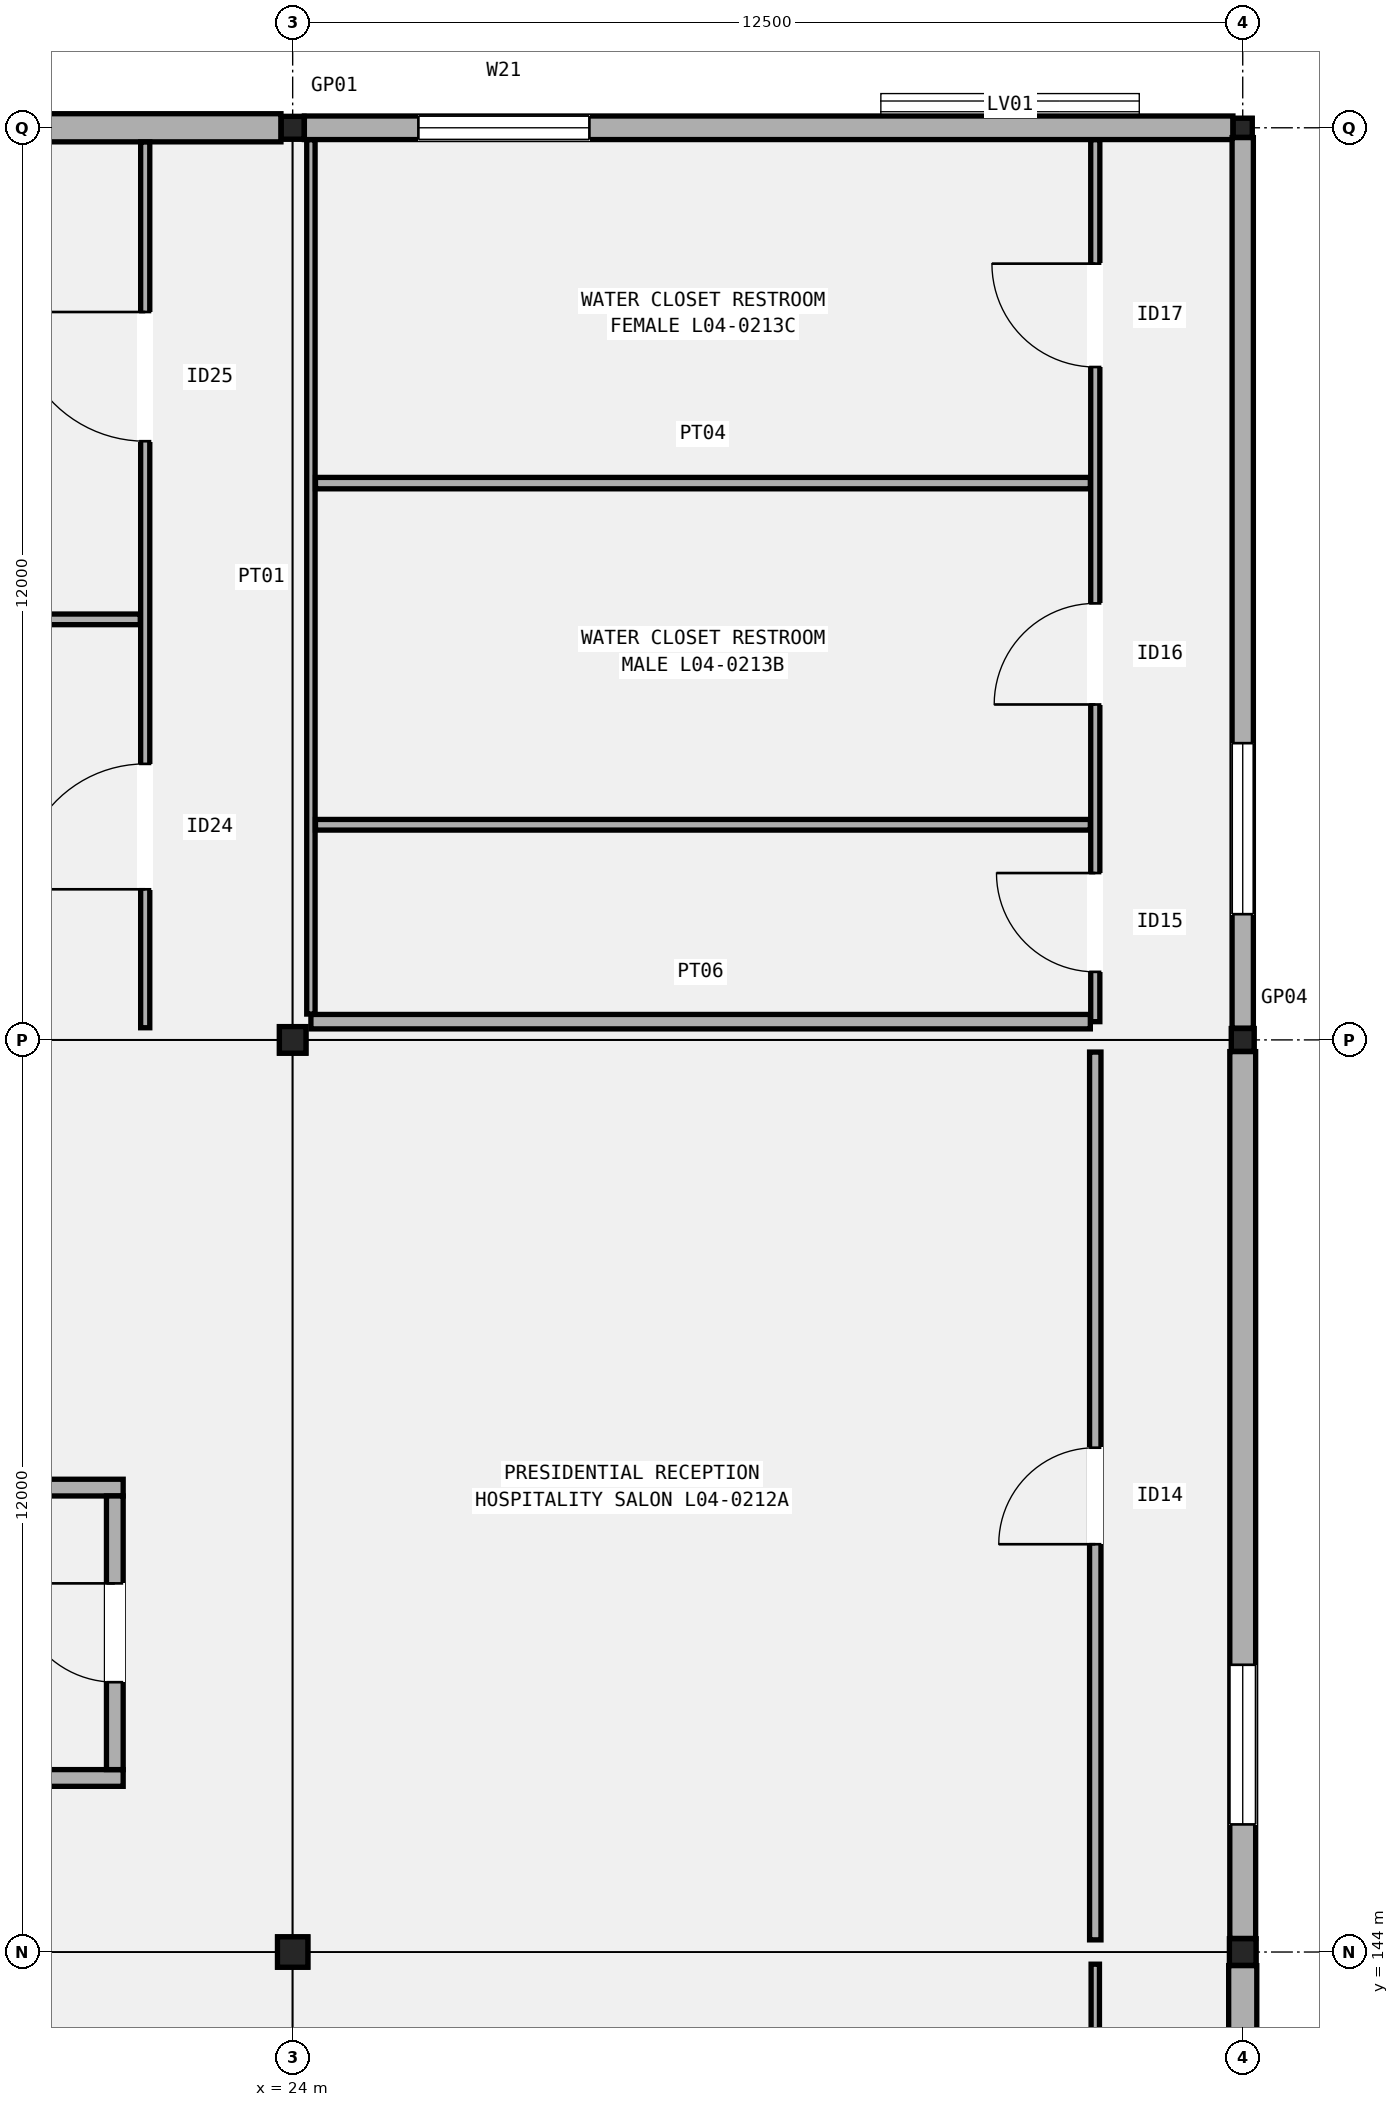
"""IFC4 building model, lengths in metres.
Left out: names, types, materials, properties, quantities, classifications, styles, units other than length and angle.
Written with IfcOpenShell. Run it as: python <this file> out.ifc"""

import sys

from ifc_helpers import new_model, si_unit, direction, frame, frame_2d, origin, origin_2d, place, context, subcontext, project, spatial, rectangle, hollow_rectangle, extrude, element, fill, save


model = new_model("IFC4")
c1 = context("Model", 3, precision=1e-05, world=origin(), true_north=direction((0.0, 1.0)))
c2 = subcontext(c1, "Body", "Model", "MODEL_VIEW")
j1 = project(units=[si_unit("LENGTHUNIT", "METRE"), si_unit("PLANEANGLEUNIT", "RADIAN")], contexts=[c1])
p1 = place(None, origin())
s1 = spatial("IfcSite", under=j1, at=p1, CompositionType="ELEMENT")
p2 = place(p1, origin())
s2 = spatial("IfcBuilding", under=s1, at=p2, CompositionType="ELEMENT")
p3 = place(p2, frame((0.0, 0.0, 20.4)))
s3 = spatial("IfcBuildingStorey", under=s2, at=p3, CompositionType="ELEMENT", Elevation=20.4)
p4 = place(p3, frame((24.0, 144.0, 0.0), z_axis=(0.0, 0.0, 1.0), x_axis=(1.0, 0.0, 0.0)))
e1 = element("IfcColumn", 1, at=p4, inside=s3, PredefinedType="COLUMN", context=c2, shape_type="SweptSolid", body=[
    extrude(hollow_rectangle(XDim=0.4, YDim=0.4, WallThickness=0.016, InnerFilletRadius=0.016, OuterFilletRadius=0.032, at=origin_2d()), origin(), (0.0, 0.0, 1.0), 5.4),
])
p5 = place(p3, frame((24.0, 156.0, 0.0), z_axis=(0.0, 0.0, 1.0), x_axis=(1.0, 0.0, 0.0)))
e2 = element("IfcColumn", 2, at=p5, inside=s3, PredefinedType="COLUMN", context=c2, shape_type="SweptSolid", body=[
    extrude(hollow_rectangle(XDim=0.35, YDim=0.35, WallThickness=0.016, InnerFilletRadius=0.016, OuterFilletRadius=0.032, at=origin_2d()), origin(), (0.0, 0.0, 1.0), 5.4),
])
p6 = place(p3, frame((24.0, 168.0, 0.0), z_axis=(0.0, 0.0, 1.0), x_axis=(1.0, 0.0, 0.0)))
e3 = element("IfcColumn", 3, at=p6, inside=s3, PredefinedType="COLUMN", context=c2, shape_type="SweptSolid", body=[
    extrude(hollow_rectangle(XDim=0.3, YDim=0.3, WallThickness=0.012, InnerFilletRadius=0.012, OuterFilletRadius=0.024, at=origin_2d()), origin(), (0.0, 0.0, 1.0), 5.4),
])
p7 = place(p3, frame((36.5, 144.0, 0.0), z_axis=(0.0, 0.0, 1.0), x_axis=(1.0, 0.0, 0.0)))
e4 = element("IfcColumn", 4, at=p7, inside=s3, PredefinedType="COLUMN", context=c2, shape_type="SweptSolid", body=[
    extrude(hollow_rectangle(XDim=0.35, YDim=0.35, WallThickness=0.016, InnerFilletRadius=0.016, OuterFilletRadius=0.032, at=origin_2d()), origin(), (0.0, 0.0, 1.0), 5.4),
])
p8 = place(p3, frame((36.5, 156.0, 0.0), z_axis=(0.0, 0.0, 1.0), x_axis=(1.0, 0.0, 0.0)))
e5 = element("IfcColumn", 5, at=p8, inside=s3, PredefinedType="COLUMN", context=c2, shape_type="SweptSolid", body=[
    extrude(hollow_rectangle(XDim=0.3, YDim=0.3, WallThickness=0.012, InnerFilletRadius=0.012, OuterFilletRadius=0.024, at=origin_2d()), origin(), (0.0, 0.0, 1.0), 5.4),
])
p9 = place(p3, frame((36.5, 168.0, 0.0), z_axis=(0.0, 0.0, 1.0), x_axis=(1.0, 0.0, 0.0)))
e6 = element("IfcColumn", 6, at=p9, inside=s3, PredefinedType="COLUMN", context=c2, shape_type="SweptSolid", body=[
    extrude(hollow_rectangle(XDim=0.25, YDim=0.25, WallThickness=0.012, InnerFilletRadius=0.012, OuterFilletRadius=0.024, at=origin_2d()), origin(), (0.0, 0.0, 1.0), 5.4),
])
p10 = place(p3, frame((12.179, 168.0, 0.0), z_axis=(0.0, 0.0, 1.0), x_axis=(1.0, 0.0, 0.0)))
e7 = element("IfcWall", 7, at=p10, inside=s3, PredefinedType="SOLIDWALL", context=c2, shape_type="SweptSolid", body=[
    extrude(rectangle(XDim=11.667, YDim=0.37, at=frame_2d((5.833, 0.0))), origin(), (0.0, 0.0, 1.0), 4.48),
])
p11 = place(p10, frame((1.5, 0.0, 0.95)))
e8 = element("IfcOpeningElement", 8, at=p11, cuts=e7, PredefinedType="OPENING", context=c2, shape_type="SweptSolid", body=[
    extrude(rectangle(XDim=1.8, YDim=1.75, at=frame_2d((0.9, 0.875))), frame((0.0, 0.195, 0.0), z_axis=(0.0, -1.0, 0.0), x_axis=(1.0, 0.0, 0.0)), (0.0, 0.0, 1.0), 0.39),
])
p12 = place(p3, frame((36.5, 132.204, 0.0), z_axis=(0.0, 0.0, 1.0), x_axis=(0.0, 1.0, 0.0)))
e9 = element("IfcWall", 9, at=p12, inside=s3, PredefinedType="SOLIDWALL", context=c2, shape_type="SweptSolid", body=[
    extrude(rectangle(XDim=11.617, YDim=0.37, at=frame_2d((5.809, 0.0))), origin(), (0.0, 0.0, 1.0), 4.592),
])
p13 = place(p12, frame((1.5, 0.0, 0.95)))
e10 = element("IfcOpeningElement", 10, at=p13, cuts=e9, PredefinedType="OPENING", context=c2, shape_type="SweptSolid", body=[
    extrude(rectangle(XDim=2.1, YDim=2.25, at=frame_2d((1.05, 1.125))), frame((0.0, 0.195, 0.0), z_axis=(0.0, -1.0, 0.0), x_axis=(1.0, 0.0, 0.0)), (0.0, 0.0, 1.0), 0.39),
])
p14 = place(p3, frame((36.5, 144.179, 0.0), z_axis=(0.0, 0.0, 1.0), x_axis=(0.0, 1.0, 0.0)))
e11 = element("IfcWall", 11, at=p14, inside=s3, PredefinedType="SOLIDWALL", context=c2, shape_type="SweptSolid", body=[
    extrude(rectangle(XDim=11.667, YDim=0.34, at=frame_2d((5.833, 0.0))), origin(), (0.0, 0.0, 1.0), 4.48),
])
p15 = place(p14, frame((1.5, 0.0, 0.95)))
e12 = element("IfcOpeningElement", 12, at=p15, cuts=e11, PredefinedType="OPENING", context=c2, shape_type="SweptSolid", body=[
    extrude(rectangle(XDim=2.1, YDim=2.6, at=frame_2d((1.05, 1.3))), frame((0.0, 0.18, 0.0), z_axis=(0.0, -1.0, 0.0), x_axis=(1.0, 0.0, 0.0)), (0.0, 0.0, 1.0), 0.36),
])
p16 = place(p3, frame((24.154, 168.0, 0.0), z_axis=(0.0, 0.0, 1.0), x_axis=(1.0, 0.0, 0.0)))
e13 = element("IfcWall", 13, at=p16, inside=s3, PredefinedType="SOLIDWALL", context=c2, shape_type="SweptSolid", body=[
    extrude(rectangle(XDim=12.217, YDim=0.31, at=frame_2d((6.108, 0.0))), origin(), (0.0, 0.0, 1.0), 4.58),
])
p17 = place(p16, frame((1.5, 0.0, 0.95)))
e14 = element("IfcOpeningElement", 14, at=p17, cuts=e13, PredefinedType="OPENING", context=c2, shape_type="SweptSolid", body=[
    extrude(rectangle(XDim=2.25, YDim=1.8, at=frame_2d((1.125, 0.9))), frame((0.0, 0.165, 0.0), z_axis=(0.0, -1.0, 0.0), x_axis=(1.0, 0.0, 0.0)), (0.0, 0.0, 1.0), 0.33),
])
p18 = place(p3, frame((36.5, 156.154, 0.0), z_axis=(0.0, 0.0, 1.0), x_axis=(0.0, 1.0, 0.0)))
e15 = element("IfcWall", 15, at=p18, inside=s3, PredefinedType="SOLIDWALL", context=c2, shape_type="SweptSolid", body=[
    extrude(rectangle(XDim=11.717, YDim=0.28, at=frame_2d((5.858, 0.0))), origin(), (0.0, 0.0, 1.0), 4.58),
])
p19 = place(p18, frame((1.5, 0.0, 0.95)))
e16 = element("IfcOpeningElement", 16, at=p19, cuts=e15, PredefinedType="OPENING", context=c2, shape_type="SweptSolid", body=[
    extrude(rectangle(XDim=2.25, YDim=2.2, at=frame_2d((1.125, 1.1))), frame((0.0, 0.15, 0.0), z_axis=(0.0, -1.0, 0.0), x_axis=(1.0, 0.0, 0.0)), (0.0, 0.0, 1.0), 0.3),
])
for number, where, z_axis, x_axis in (
    (17, (17.48, 146.29, 0.0), (0.0, 0.0, 1.0), (1.0, 0.0, 0.0)),
    (18, (17.48, 150.11, 0.0), (0.0, 0.0, 1.0), (1.0, 0.0, 0.0)),
):
    element("IfcWall", number, at=place(p3, frame(where, z_axis=z_axis, x_axis=x_axis)), inside=s3, PredefinedType="SOLIDWALL", context=c2, shape_type="SweptSolid", body=[
        extrude(rectangle(XDim=4.29, YDim=0.22, at=frame_2d((2.145, 0.0))), origin(), (0.0, 0.0, 1.0), 4.52),
    ])
p20 = place(p3, frame((21.66, 146.4, 0.0), z_axis=(0.0, 0.0, 1.0), x_axis=(0.0, 1.0, 0.0)))
e19 = element("IfcWall", 19, at=p20, inside=s3, PredefinedType="SOLIDWALL", context=c2, shape_type="SweptSolid", body=[
    extrude(rectangle(XDim=3.6, YDim=0.22, at=frame_2d((1.8, 0.0))), origin(), (0.0, 0.0, 1.0), 4.52),
])
p21 = place(p20, frame((1.15, 0.0, 0.0)))
e20 = element("IfcOpeningElement", 20, at=p21, cuts=e19, PredefinedType="OPENING", context=c2, shape_type="SweptSolid", body=[
    extrude(rectangle(XDim=1.3, YDim=2.15, at=frame_2d((0.65, 1.075))), frame((0.0, 0.12, 0.0), z_axis=(0.0, -1.0, 0.0), x_axis=(1.0, 0.0, 0.0)), (0.0, 0.0, 1.0), 0.24),
])
p22 = place(p3, frame((22.06, 156.16, 0.0), z_axis=(0.0, 0.0, 1.0), x_axis=(0.0, 1.0, 0.0)))
e21 = element("IfcWall", 21, at=p22, inside=s3, PredefinedType="PARTITIONING", context=c2, shape_type="SweptSolid", body=[
    extrude(rectangle(XDim=11.653, YDim=0.12, at=frame_2d((5.827, 0.0))), origin(), (0.0, 0.0, 1.0), 4.52),
])
p23 = place(p22, frame((1.821, 0.0, 0.0)))
e22 = element("IfcOpeningElement", 22, at=p23, cuts=e21, PredefinedType="OPENING", context=c2, shape_type="SweptSolid", body=[
    extrude(rectangle(XDim=1.65, YDim=2.28, at=frame_2d((0.825, 1.14))), frame((0.0, 0.07, 0.0), z_axis=(0.0, -1.0, 0.0), x_axis=(1.0, 0.0, 0.0)), (0.0, 0.0, 1.0), 0.14),
])
p24 = place(p22, frame((7.716, 0.0, 0.0)))
e23 = element("IfcOpeningElement", 23, at=p24, cuts=e21, PredefinedType="OPENING", context=c2, shape_type="SweptSolid", body=[
    extrude(rectangle(XDim=1.7, YDim=2.32, at=frame_2d((0.85, 1.16))), frame((0.0, 0.07, 0.0), z_axis=(0.0, -1.0, 0.0), x_axis=(1.0, 0.0, 0.0)), (0.0, 0.0, 1.0), 0.14),
])
p25 = place(p3, frame((12.08, 161.533, 0.0), z_axis=(0.0, 0.0, 1.0), x_axis=(1.0, 0.0, 0.0)))
e24 = element("IfcWall", 24, at=p25, inside=s3, PredefinedType="PARTITIONING", context=c2, shape_type="SweptSolid", body=[
    extrude(rectangle(XDim=9.915, YDim=0.14, at=frame_2d((4.958, 0.0))), origin(), (0.0, 0.0, 1.0), 4.52),
])
p26 = place(p3, frame((34.56, 132.16, 0.0), z_axis=(0.0, 0.0, 1.0), x_axis=(0.0, 1.0, 0.0)))
e25 = element("IfcWall", 25, at=p26, inside=s3, PredefinedType="PARTITIONING", context=c2, shape_type="SweptSolid", body=[
    extrude(rectangle(XDim=11.68, YDim=0.11, at=frame_2d((5.84, 0.0))), origin(), (0.0, 0.0, 1.0), 4.52),
])
p27 = place(p26, frame((2.042, 0.0, 0.0)))
e26 = element("IfcOpeningElement", 26, at=p27, cuts=e25, PredefinedType="OPENING", context=c2, shape_type="SweptSolid", body=[
    extrude(rectangle(XDim=1.21, YDim=2.18, at=frame_2d((0.605, 1.09))), frame((0.0, 0.065, 0.0), z_axis=(0.0, -1.0, 0.0), x_axis=(1.0, 0.0, 0.0)), (0.0, 0.0, 1.0), 0.13),
])
p28 = place(p26, frame((7.946, 0.0, 0.0)))
e27 = element("IfcOpeningElement", 27, at=p28, cuts=e25, PredefinedType="OPENING", context=c2, shape_type="SweptSolid", body=[
    extrude(rectangle(XDim=1.24, YDim=2.22, at=frame_2d((0.62, 1.11))), frame((0.0, 0.065, 0.0), z_axis=(0.0, -1.0, 0.0), x_axis=(1.0, 0.0, 0.0)), (0.0, 0.0, 1.0), 0.13),
])
p29 = place(p3, frame((34.56, 144.16, 0.0), z_axis=(0.0, 0.0, 1.0), x_axis=(0.0, 1.0, 0.0)))
e28 = element("IfcWall", 28, at=p29, inside=s3, PredefinedType="PARTITIONING", context=c2, shape_type="SweptSolid", body=[
    extrude(rectangle(XDim=11.68, YDim=0.15, at=frame_2d((5.84, 0.0))), origin(), (0.0, 0.0, 1.0), 4.52),
])
p30 = place(p29, frame((5.205, 0.0, 0.0)))
e29 = element("IfcOpeningElement", 29, at=p30, cuts=e28, PredefinedType="OPENING", context=c2, shape_type="SweptSolid", body=[
    extrude(rectangle(XDim=1.27, YDim=2.2, at=frame_2d((0.635, 1.1))), frame((0.0, 0.085, 0.0), z_axis=(0.0, -1.0, 0.0), x_axis=(1.0, 0.0, 0.0)), (0.0, 0.0, 1.0), 0.17),
])
p31 = place(p3, frame((34.56, 156.24, 0.0), z_axis=(0.0, 0.0, 1.0), x_axis=(0.0, 1.0, 0.0)))
e30 = element("IfcWall", 30, at=p31, inside=s3, PredefinedType="PARTITIONING", context=c2, shape_type="SweptSolid", body=[
    extrude(rectangle(XDim=11.603, YDim=0.12, at=frame_2d((5.802, 0.0))), origin(), (0.0, 0.0, 1.0), 4.52),
])
p32 = place(p31, frame((0.655, 0.0, 0.0)))
e31 = element("IfcOpeningElement", 31, at=p32, cuts=e30, PredefinedType="OPENING", context=c2, shape_type="SweptSolid", body=[
    extrude(rectangle(XDim=1.3, YDim=2.24, at=frame_2d((0.65, 1.12))), frame((0.0, 0.07, 0.0), z_axis=(0.0, -1.0, 0.0), x_axis=(1.0, 0.0, 0.0)), (0.0, 0.0, 1.0), 0.14),
])
p33 = place(p31, frame((4.173, 0.0, 0.0)))
e32 = element("IfcOpeningElement", 32, at=p33, cuts=e30, PredefinedType="OPENING", context=c2, shape_type="SweptSolid", body=[
    extrude(rectangle(XDim=1.33, YDim=2.22, at=frame_2d((0.665, 1.11))), frame((0.0, 0.07, 0.0), z_axis=(0.0, -1.0, 0.0), x_axis=(1.0, 0.0, 0.0)), (0.0, 0.0, 1.0), 0.14),
])
p34 = place(p31, frame((8.613, 0.0, 0.0)))
e33 = element("IfcOpeningElement", 33, at=p34, cuts=e30, PredefinedType="OPENING", context=c2, shape_type="SweptSolid", body=[
    extrude(rectangle(XDim=1.36, YDim=2.25, at=frame_2d((0.68, 1.125))), frame((0.0, 0.07, 0.0), z_axis=(0.0, -1.0, 0.0), x_axis=(1.0, 0.0, 0.0)), (0.0, 0.0, 1.0), 0.14),
])
p35 = place(p3, frame((24.24, 156.24, 0.0), z_axis=(0.0, 0.0, 1.0), x_axis=(1.0, 0.0, 0.0)))
e34 = element("IfcWall", 34, at=p35, inside=s3, PredefinedType="PARTITIONING", context=c2, shape_type="SweptSolid", body=[
    extrude(rectangle(XDim=10.255, YDim=0.19, at=frame_2d((5.127, 0.0))), origin(), (0.0, 0.0, 1.0), 4.44),
])
p36 = place(p3, frame((24.24, 156.34, 0.0), z_axis=(0.0, 0.0, 1.0), x_axis=(0.0, 1.0, 0.0)))
e35 = element("IfcWall", 35, at=p36, inside=s3, PredefinedType="PARTITIONING", context=c2, shape_type="SweptSolid", body=[
    extrude(rectangle(XDim=11.503, YDim=0.11, at=frame_2d((5.751, 0.0))), origin(), (0.0, 0.0, 1.0), 4.44),
])
p37 = place(p3, frame((24.3, 158.83, 0.0), z_axis=(0.0, 0.0, 1.0), x_axis=(1.0, 0.0, 0.0)))
e36 = element("IfcWall", 36, at=p37, inside=s3, PredefinedType="PARTITIONING", context=c2, shape_type="SweptSolid", body=[
    extrude(rectangle(XDim=10.195, YDim=0.14, at=frame_2d((5.098, 0.0))), origin(), (0.0, 0.0, 1.0), 4.52),
])
p38 = place(p3, frame((24.3, 163.325, 0.0), z_axis=(0.0, 0.0, 1.0), x_axis=(1.0, 0.0, 0.0)))
e37 = element("IfcWall", 37, at=p38, inside=s3, PredefinedType="PARTITIONING", context=c2, shape_type="SweptSolid", body=[
    extrude(rectangle(XDim=10.195, YDim=0.15, at=frame_2d((5.098, 0.0))), origin(), (0.0, 0.0, 1.0), 4.52),
])
p39 = place(p15, origin())
e38 = element("IfcWindow", 38, at=p39, inside=s3, PartitioningType="SINGLE_PANEL", PredefinedType="WINDOW", context=c2, shape_type="SweptSolid", body=[
    extrude(rectangle(XDim=2.1, YDim=2.6, at=frame_2d((1.05, 1.3))), frame((0.0, 0.03, 0.0), z_axis=(0.0, -1.0, 0.0), x_axis=(1.0, 0.0, 0.0)), (0.0, 0.0, 1.0), 0.06),
])
fill(e12, e38)
p40 = place(p17, origin())
e39 = element("IfcWindow", 39, at=p40, inside=s3, PartitioningType="SINGLE_PANEL", PredefinedType="WINDOW", context=c2, shape_type="SweptSolid", body=[
    extrude(rectangle(XDim=2.25, YDim=1.8, at=frame_2d((1.125, 0.9))), frame((0.0, 0.03, 0.0), z_axis=(0.0, -1.0, 0.0), x_axis=(1.0, 0.0, 0.0)), (0.0, 0.0, 1.0), 0.06),
])
fill(e14, e39)
p41 = place(p19, origin())
e40 = element("IfcWindow", 40, at=p41, inside=s3, PartitioningType="SINGLE_PANEL", PredefinedType="WINDOW", context=c2, shape_type="SweptSolid", body=[
    extrude(rectangle(XDim=2.25, YDim=2.2, at=frame_2d((1.125, 1.1))), frame((0.0, 0.03, 0.0), z_axis=(0.0, -1.0, 0.0), x_axis=(1.0, 0.0, 0.0)), (0.0, 0.0, 1.0), 0.06),
])
fill(e16, e40)
p42 = place(p21, origin())
e41 = element("IfcDoor", 41, at=p42, inside=s3, OperationType="SINGLE_SWING_RIGHT", PredefinedType="DOOR", context=c2, shape_type="SweptSolid", body=[
    extrude(rectangle(XDim=1.3, YDim=2.15, at=frame_2d((0.65, 1.075))), frame((0.0, 0.025, 0.0), z_axis=(0.0, -1.0, 0.0), x_axis=(1.0, 0.0, 0.0)), (0.0, 0.0, 1.0), 0.05),
])
fill(e20, e41)
p43 = place(p23, origin())
e42 = element("IfcDoor", 42, at=p43, inside=s3, OperationType="SINGLE_SWING_LEFT", PredefinedType="DOOR", context=c2, shape_type="SweptSolid", body=[
    extrude(rectangle(XDim=1.65, YDim=2.28, at=frame_2d((0.825, 1.14))), frame((0.0, 0.025, 0.0), z_axis=(0.0, -1.0, 0.0), x_axis=(1.0, 0.0, 0.0)), (0.0, 0.0, 1.0), 0.05),
])
fill(e22, e42)
p44 = place(p24, origin())
e43 = element("IfcDoor", 43, at=p44, inside=s3, OperationType="SINGLE_SWING_RIGHT", PredefinedType="DOOR", context=c2, shape_type="SweptSolid", body=[
    extrude(rectangle(XDim=1.7, YDim=2.32, at=frame_2d((0.85, 1.16))), frame((0.0, 0.025, 0.0), z_axis=(0.0, -1.0, 0.0), x_axis=(1.0, 0.0, 0.0)), (0.0, 0.0, 1.0), 0.05),
])
fill(e23, e43)
p45 = place(p30, origin())
e44 = element("IfcDoor", 44, at=p45, inside=s3, OperationType="SINGLE_SWING_LEFT", PredefinedType="DOOR", context=c2, shape_type="SweptSolid", body=[
    extrude(rectangle(XDim=1.27, YDim=2.2, at=frame_2d((0.635, 1.1))), frame((0.0, 0.025, 0.0), z_axis=(0.0, -1.0, 0.0), x_axis=(1.0, 0.0, 0.0)), (0.0, 0.0, 1.0), 0.05),
])
fill(e29, e44)
p46 = place(p32, origin())
e45 = element("IfcDoor", 45, at=p46, inside=s3, OperationType="SINGLE_SWING_RIGHT", PredefinedType="DOOR", context=c2, shape_type="SweptSolid", body=[
    extrude(rectangle(XDim=1.3, YDim=2.24, at=frame_2d((0.65, 1.12))), frame((0.0, 0.025, 0.0), z_axis=(0.0, -1.0, 0.0), x_axis=(1.0, 0.0, 0.0)), (0.0, 0.0, 1.0), 0.05),
])
fill(e31, e45)
p47 = place(p33, origin())
e46 = element("IfcDoor", 46, at=p47, inside=s3, OperationType="SINGLE_SWING_LEFT", PredefinedType="DOOR", context=c2, shape_type="SweptSolid", body=[
    extrude(rectangle(XDim=1.33, YDim=2.22, at=frame_2d((0.665, 1.11))), frame((0.0, 0.025, 0.0), z_axis=(0.0, -1.0, 0.0), x_axis=(1.0, 0.0, 0.0)), (0.0, 0.0, 1.0), 0.05),
])
fill(e32, e46)
p48 = place(p34, origin())
e47 = element("IfcDoor", 47, at=p48, inside=s3, OperationType="SINGLE_SWING_RIGHT", PredefinedType="DOOR", context=c2, shape_type="SweptSolid", body=[
    extrude(rectangle(XDim=1.36, YDim=2.25, at=frame_2d((0.68, 1.125))), frame((0.0, 0.025, 0.0), z_axis=(0.0, -1.0, 0.0), x_axis=(1.0, 0.0, 0.0)), (0.0, 0.0, 1.0), 0.05),
])
fill(e33, e47)
save(model, sys.argv[1])
